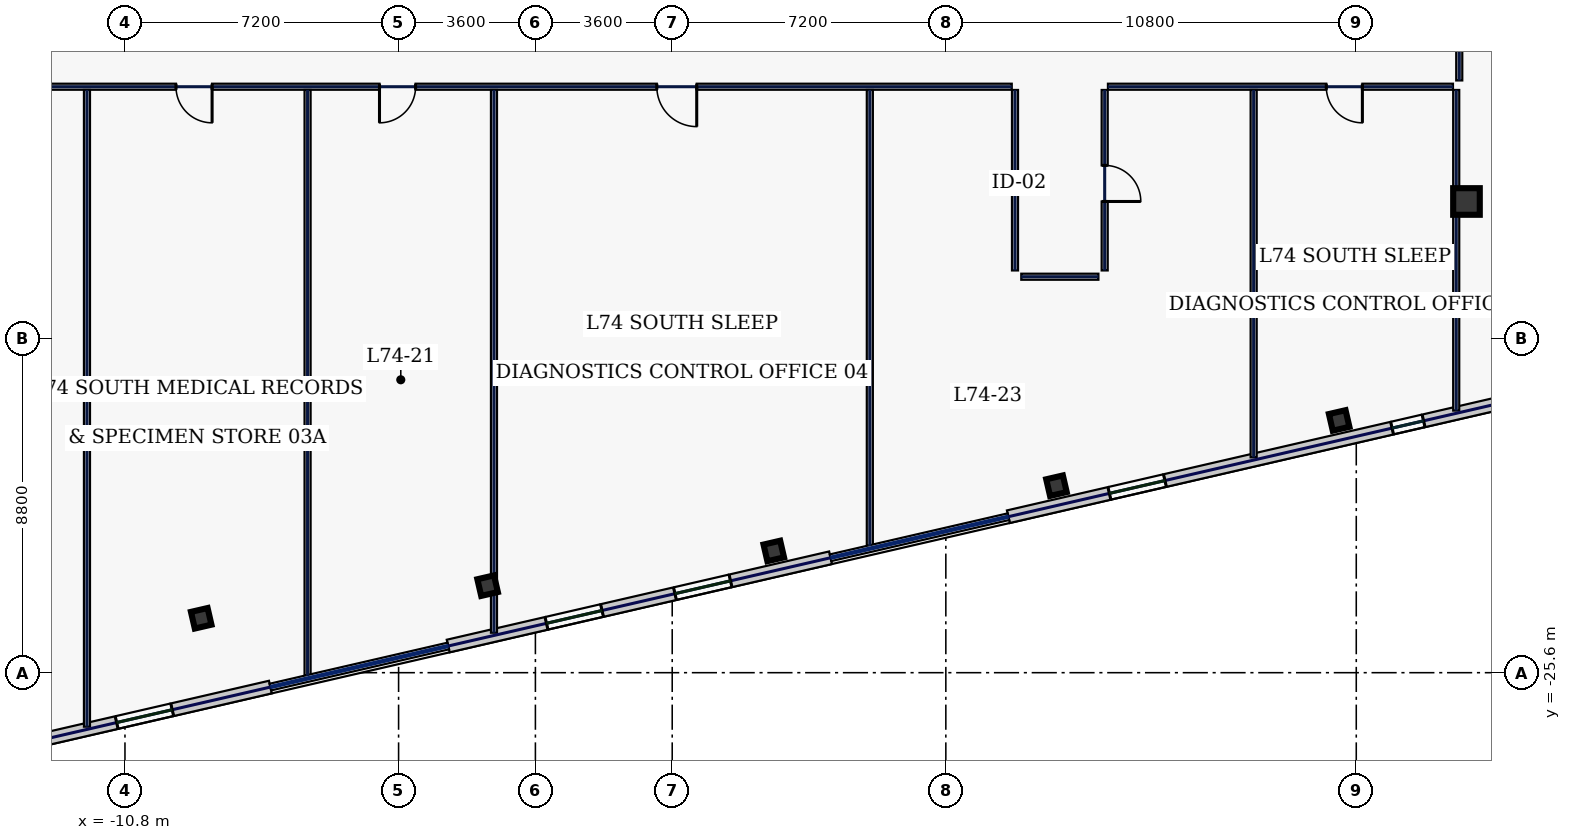
"""IFC4 building model, lengths in metres.
Left out: names, types, materials, properties, quantities, classifications, styles, units other than length and angle.
Written with IfcOpenShell. Run it as: python <this file> out.ifc"""

import sys

from ifc_helpers import new_model, si_unit, direction, frame, frame_2d, origin, origin_2d, place, context, subcontext, project, spatial, rectangle, hollow_rectangle, extrude, element, fill, save


model = new_model("IFC4")
c1 = context("Model", 3, precision=1e-05, world=origin(), true_north=direction((0.0, 1.0)))
c2 = subcontext(c1, "Body", "Model", "MODEL_VIEW")
j1 = project(units=[si_unit("LENGTHUNIT", "METRE"), si_unit("PLANEANGLEUNIT", "RADIAN")], contexts=[c1])
p1 = place(None, origin())
s1 = spatial("IfcSite", under=j1, at=p1, CompositionType="ELEMENT")
p2 = place(p1, origin())
s2 = spatial("IfcBuilding", under=s1, at=p2, CompositionType="ELEMENT")
p3 = place(p2, frame((0.0, 0.0, 317.0)))
s3 = spatial("IfcBuildingStorey", under=s2, at=p3, CompositionType="ELEMENT", Elevation=317.0)
p4 = place(p3, frame((24.5, -13.2, 0.0), z_axis=(0.0, 0.0, 1.0), x_axis=(1.0, 0.0, 0.0)))
e1 = element("IfcColumn", 1, at=p4, inside=s3, PredefinedType="COLUMN", context=c2, shape_type="SweptSolid", body=[
    extrude(hollow_rectangle(XDim=0.7, YDim=0.7, WallThickness=0.032, at=origin_2d()), origin(), (0.0, 0.0, 1.0), 3.74),
])
for number, where, z_axis, x_axis in (
    (2, (-8.794, -24.168, 0.0), (0.0, 0.0, 1.0), (0.974, 0.225, 0.0)),
    (3, (-1.258, -23.31, 0.0), (0.0, 0.0, 1.0), (0.974, 0.225, 0.0)),
    (4, (6.273, -22.397, 0.0), (0.0, 0.0, 1.0), (0.974, 0.225, 0.0)),
    (5, (13.711, -20.68, 0.0), (0.0, 0.0, 1.0), (0.974, 0.225, 0.0)),
    (6, (21.15, -18.962, 0.0), (0.0, 0.0, 1.0), (0.974, 0.225, 0.0)),
):
    element("IfcColumn", number, at=place(p3, frame(where, z_axis=z_axis, x_axis=x_axis)), inside=s3, PredefinedType="COLUMN", context=c2, shape_type="SweptSolid", body=[
        extrude(hollow_rectangle(XDim=0.45, YDim=0.45, WallThickness=0.022, at=origin_2d()), origin(), (0.0, 0.0, 1.0), 3.74),
    ])
p5 = place(p3, frame((-24.03, -29.916, 0.0), z_axis=(0.0, 0.0, 1.0), x_axis=(0.974370978061, 0.224947098473, 0.0)))
e7 = element("IfcWall", 7, at=p5, inside=s3, PredefinedType="STANDARD", context=c2, shape_type="SweptSolid", body=[
    extrude(rectangle(XDim=17.506, YDim=0.34, at=frame_2d((8.753, 0.0))), origin(), (0.0, 0.0, 1.0), 3.74),
])
p6 = place(p5, frame((2.35, 0.0, 0.9)))
e8 = element("IfcOpeningElement", 8, at=p6, cuts=e7, PredefinedType="OPENING", context=c2, shape_type="SweptSolid", body=[
    extrude(rectangle(XDim=1.5, YDim=2.0, at=frame_2d((0.75, 1.0))), frame((0.0, 0.18, 0.0), z_axis=(0.0, -1.0, 0.0), x_axis=(1.0, 0.0, 0.0)), (0.0, 0.0, 1.0), 0.36),
])
p7 = place(p5, frame((5.817, 0.0, 0.9)))
e9 = element("IfcOpeningElement", 9, at=p7, cuts=e7, PredefinedType="OPENING", context=c2, shape_type="SweptSolid", body=[
    extrude(rectangle(XDim=1.5, YDim=2.0, at=frame_2d((0.75, 1.0))), frame((0.0, 0.18, 0.0), z_axis=(0.0, -1.0, 0.0), x_axis=(1.0, 0.0, 0.0)), (0.0, 0.0, 1.0), 0.36),
])
p8 = place(p5, frame((9.886, 0.0, 0.9)))
e10 = element("IfcOpeningElement", 10, at=p8, cuts=e7, PredefinedType="OPENING", context=c2, shape_type="SweptSolid", body=[
    extrude(rectangle(XDim=1.5, YDim=2.0, at=frame_2d((0.75, 1.0))), frame((0.0, 0.18, 0.0), z_axis=(0.0, -1.0, 0.0), x_axis=(1.0, 0.0, 0.0)), (0.0, 0.0, 1.0), 0.36),
])
p9 = place(p5, frame((13.353, 0.0, 0.9)))
e11 = element("IfcOpeningElement", 11, at=p9, cuts=e7, PredefinedType="OPENING", context=c2, shape_type="SweptSolid", body=[
    extrude(rectangle(XDim=1.5, YDim=2.0, at=frame_2d((0.75, 1.0))), frame((0.0, 0.18, 0.0), z_axis=(0.0, -1.0, 0.0), x_axis=(1.0, 0.0, 0.0)), (0.0, 0.0, 1.0), 0.36),
])
p10 = place(p3, frame((-2.295, -24.898, 0.0), z_axis=(0.0, 0.0, 1.0), x_axis=(0.974370872906, 0.224947553958, 0.0)))
e12 = element("IfcWall", 12, at=p10, inside=s3, PredefinedType="STANDARD", context=c2, shape_type="SweptSolid", body=[
    extrude(rectangle(XDim=10.328, YDim=0.34, at=frame_2d((5.164, 0.0))), origin(), (0.0, 0.0, 1.0), 3.74),
])
p11 = place(p10, frame((2.655, 0.0, 0.9)))
e13 = element("IfcOpeningElement", 13, at=p11, cuts=e12, PredefinedType="OPENING", context=c2, shape_type="SweptSolid", body=[
    extrude(rectangle(XDim=1.5, YDim=2.0, at=frame_2d((0.75, 1.0))), frame((0.0, 0.18, 0.0), z_axis=(0.0, -1.0, 0.0), x_axis=(1.0, 0.0, 0.0)), (0.0, 0.0, 1.0), 0.36),
])
p12 = place(p10, frame((6.124, 0.0, 0.9)))
e14 = element("IfcOpeningElement", 14, at=p12, cuts=e12, PredefinedType="OPENING", context=c2, shape_type="SweptSolid", body=[
    extrude(rectangle(XDim=1.5, YDim=2.0, at=frame_2d((0.75, 1.0))), frame((0.0, 0.18, 0.0), z_axis=(0.0, -1.0, 0.0), x_axis=(1.0, 0.0, 0.0)), (0.0, 0.0, 1.0), 0.36),
])
p13 = place(p3, frame((12.445, -21.495, 0.0), z_axis=(0.0, 0.0, 1.0), x_axis=(0.974369392164, 0.224953967767, 0.0)))
e15 = element("IfcWall", 15, at=p13, inside=s3, PredefinedType="STANDARD", context=c2, shape_type="SweptSolid", body=[
    extrude(rectangle(XDim=17.366, YDim=0.34, at=frame_2d((8.683, 0.0))), origin(), (0.0, 0.0, 1.0), 3.74),
])
p14 = place(p13, frame((2.729, 0.0, 0.9)))
e16 = element("IfcOpeningElement", 16, at=p14, cuts=e15, PredefinedType="OPENING", context=c2, shape_type="SweptSolid", body=[
    extrude(rectangle(XDim=1.5, YDim=2.0, at=frame_2d((0.75, 1.0))), frame((0.0, 0.18, 0.0), z_axis=(0.0, -1.0, 0.0), x_axis=(1.0, 0.0, 0.0)), (0.0, 0.0, 1.0), 0.36),
])
p15 = place(p13, frame((10.363, 0.0, 0.9)))
e17 = element("IfcOpeningElement", 17, at=p15, cuts=e15, PredefinedType="OPENING", context=c2, shape_type="SweptSolid", body=[
    extrude(rectangle(XDim=0.85, YDim=1.85, at=frame_2d((0.425, 0.925))), frame((0.0, 0.18, 0.0), z_axis=(0.0, -1.0, 0.0), x_axis=(1.0, 0.0, 0.0)), (0.0, 0.0, 1.0), 0.36),
])
p16 = place(p13, frame((13.875, 0.0, 0.9)))
e18 = element("IfcOpeningElement", 18, at=p16, cuts=e15, PredefinedType="OPENING", context=c2, shape_type="SweptSolid", body=[
    extrude(rectangle(XDim=1.5, YDim=2.0, at=frame_2d((0.75, 1.0))), frame((0.0, 0.18, 0.0), z_axis=(0.0, -1.0, 0.0), x_axis=(1.0, 0.0, 0.0)), (0.0, 0.0, 1.0), 0.36),
])
p17 = place(p3, frame((32.686, -12.276, 0.0), z_axis=(0.0, 0.0, 1.0), x_axis=(-0.224953091034, 0.974369594576, 0.0)))
e19 = element("IfcWall", 19, at=p17, inside=s3, PredefinedType="STANDARD", context=c2, shape_type="SweptSolid", body=[
    extrude(rectangle(XDim=36.2, YDim=0.34, at=frame_2d((18.1, 0.0))), origin(), (0.0, 0.0, 1.0), 3.74),
])
p18 = place(p17, frame((3.725, 0.0, 0.58)))
e20 = element("IfcOpeningElement", 20, at=p18, cuts=e19, PredefinedType="OPENING", context=c2, shape_type="SweptSolid", body=[
    extrude(rectangle(XDim=1.6, YDim=2.3, at=frame_2d((0.8, 1.15))), frame((0.0, 0.18, 0.0), z_axis=(0.0, -1.0, 0.0), x_axis=(1.0, 0.0, 0.0)), (0.0, 0.0, 1.0), 0.36),
])
p19 = place(p17, frame((12.775, 0.0, 0.58)))
e21 = element("IfcOpeningElement", 21, at=p19, cuts=e19, PredefinedType="OPENING", context=c2, shape_type="SweptSolid", body=[
    extrude(rectangle(XDim=1.6, YDim=2.3, at=frame_2d((0.8, 1.15))), frame((0.0, 0.18, 0.0), z_axis=(0.0, -1.0, 0.0), x_axis=(1.0, 0.0, 0.0)), (0.0, 0.0, 1.0), 0.36),
])
p20 = place(p17, frame((21.825, 0.0, 0.58)))
e22 = element("IfcOpeningElement", 22, at=p20, cuts=e19, PredefinedType="OPENING", context=c2, shape_type="SweptSolid", body=[
    extrude(rectangle(XDim=1.6, YDim=2.3, at=frame_2d((0.8, 1.15))), frame((0.0, 0.18, 0.0), z_axis=(0.0, -1.0, 0.0), x_axis=(1.0, 0.0, 0.0)), (0.0, 0.0, 1.0), 0.36),
])
p21 = place(p17, frame((30.875, 0.0, 0.58)))
e23 = element("IfcOpeningElement", 23, at=p21, cuts=e19, PredefinedType="OPENING", context=c2, shape_type="SweptSolid", body=[
    extrude(rectangle(XDim=1.6, YDim=2.3, at=frame_2d((0.8, 1.15))), frame((0.0, 0.18, 0.0), z_axis=(0.0, -1.0, 0.0), x_axis=(1.0, 0.0, 0.0)), (0.0, 0.0, 1.0), 0.36),
])
p22 = place(p3, frame((24.31, 10.115, 0.0), z_axis=(0.0, 0.0, 1.0), x_axis=(0.0, -1.0, 0.0)))
e24 = element("IfcWall", 24, at=p22, inside=s3, PredefinedType="PARTITIONING", context=c2, shape_type="SweptSolid", body=[
    extrude(rectangle(XDim=20.13, YDim=0.16, at=frame_2d((10.065, 0.0))), origin(), (0.0, 0.0, 1.0), 3.74),
])
p23 = place(p22, frame((15.206, 0.0, 0.0)))
e25 = element("IfcOpeningElement", 25, at=p23, cuts=e24, PredefinedType="OPENING", context=c2, shape_type="SweptSolid", body=[
    extrude(rectangle(XDim=0.95, YDim=2.2, at=frame_2d((0.475, 1.1))), frame((0.0, 0.09, 0.0), z_axis=(0.0, -1.0, 0.0), x_axis=(1.0, 0.0, 0.0)), (0.0, 0.0, 1.0), 0.18),
])
p24 = place(p22, frame((5.444, 0.0, 0.0)))
e26 = element("IfcOpeningElement", 26, at=p24, cuts=e24, PredefinedType="OPENING", context=c2, shape_type="SweptSolid", body=[
    extrude(rectangle(XDim=0.95, YDim=2.2, at=frame_2d((0.475, 1.1))), frame((0.0, 0.09, 0.0), z_axis=(0.0, -1.0, 0.0), x_axis=(1.0, 0.0, 0.0)), (0.0, 0.0, 1.0), 0.18),
])
p25 = place(p3, frame((24.145, -10.18, 0.0), z_axis=(0.0, 0.0, 1.0), x_axis=(-1.0, 0.0, 0.0)))
e27 = element("IfcWall", 27, at=p25, inside=s3, PredefinedType="PARTITIONING", context=c2, shape_type="SweptSolid", body=[
    extrude(rectangle(XDim=9.08, YDim=0.16, at=frame_2d((4.54, 0.0))), origin(), (0.0, 0.0, 1.0), 3.74),
])
p26 = place(p25, frame((2.384, 0.0, 0.0)))
e28 = element("IfcOpeningElement", 28, at=p26, cuts=e27, PredefinedType="OPENING", context=c2, shape_type="SweptSolid", body=[
    extrude(rectangle(XDim=0.95, YDim=2.2, at=frame_2d((0.475, 1.1))), frame((0.0, 0.09, 0.0), z_axis=(0.0, -1.0, 0.0), x_axis=(1.0, 0.0, 0.0)), (0.0, 0.0, 1.0), 0.18),
])
p27 = place(p3, frame((14.98, -10.265, 0.0), z_axis=(0.0, 0.0, 1.0), x_axis=(0.0, -1.0, 0.0)))
e29 = element("IfcWall", 29, at=p27, inside=s3, PredefinedType="PARTITIONING", context=c2, shape_type="SweptSolid", body=[
    extrude(rectangle(XDim=4.75, YDim=0.16, at=frame_2d((2.375, 0.0))), origin(), (0.0, 0.0, 1.0), 3.74),
])
p28 = place(p27, frame((1.985, 0.0, 0.0)))
e30 = element("IfcOpeningElement", 30, at=p28, cuts=e29, PredefinedType="OPENING", context=c2, shape_type="SweptSolid", body=[
    extrude(rectangle(XDim=0.95, YDim=2.2, at=frame_2d((0.475, 1.1))), frame((0.0, 0.09, 0.0), z_axis=(0.0, -1.0, 0.0), x_axis=(1.0, 0.0, 0.0)), (0.0, 0.0, 1.0), 0.18),
])
p29 = place(p3, frame((14.815, -15.18, 0.0), z_axis=(0.0, 0.0, 1.0), x_axis=(-1.0, 0.0, 0.0)))
e31 = element("IfcWall", 31, at=p29, inside=s3, PredefinedType="PARTITIONING", context=c2, shape_type="SweptSolid", body=[
    extrude(rectangle(XDim=2.03, YDim=0.16, at=frame_2d((1.015, 0.0))), origin(), (0.0, 0.0, 1.0), 3.74),
])
p30 = place(p3, frame((12.62, -15.015, 0.0), z_axis=(0.0, 0.0, 1.0), x_axis=(0.0, 1.0, 0.0)))
e32 = element("IfcWall", 32, at=p30, inside=s3, PredefinedType="PARTITIONING", context=c2, shape_type="SweptSolid", body=[
    extrude(rectangle(XDim=4.75, YDim=0.16, at=frame_2d((2.375, 0.0))), origin(), (0.0, 0.0, 1.0), 3.74),
])
p31 = place(p3, frame((12.535, -10.18, 0.0), z_axis=(0.0, 0.0, 1.0), x_axis=(-1.0, 0.0, 0.0)))
e33 = element("IfcWall", 33, at=p31, inside=s3, PredefinedType="PARTITIONING", context=c2, shape_type="SweptSolid", body=[
    extrude(rectangle(XDim=36.68, YDim=0.16, at=frame_2d((18.34, 0.0))), origin(), (0.0, 0.0, 1.0), 3.74),
])
p32 = place(p31, frame((33.856, 0.0, 0.0)))
e34 = element("IfcOpeningElement", 34, at=p32, cuts=e33, PredefinedType="OPENING", context=c2, shape_type="SweptSolid", body=[
    extrude(rectangle(XDim=1.15, YDim=2.2, at=frame_2d((0.575, 1.1))), frame((0.0, 0.09, 0.0), z_axis=(0.0, -1.0, 0.0), x_axis=(1.0, 0.0, 0.0)), (0.0, 0.0, 1.0), 0.18),
])
p33 = place(p31, frame((27.835, 0.0, 0.0)))
e35 = element("IfcOpeningElement", 35, at=p33, cuts=e33, PredefinedType="OPENING", context=c2, shape_type="SweptSolid", body=[
    extrude(rectangle(XDim=0.95, YDim=2.2, at=frame_2d((0.475, 1.1))), frame((0.0, 0.09, 0.0), z_axis=(0.0, -1.0, 0.0), x_axis=(1.0, 0.0, 0.0)), (0.0, 0.0, 1.0), 0.18),
])
p34 = place(p31, frame((21.042, 0.0, 0.0)))
e36 = element("IfcOpeningElement", 36, at=p34, cuts=e33, PredefinedType="OPENING", context=c2, shape_type="SweptSolid", body=[
    extrude(rectangle(XDim=0.95, YDim=2.2, at=frame_2d((0.475, 1.1))), frame((0.0, 0.09, 0.0), z_axis=(0.0, -1.0, 0.0), x_axis=(1.0, 0.0, 0.0)), (0.0, 0.0, 1.0), 0.18),
])
p35 = place(p31, frame((15.688, 0.0, 0.0)))
e37 = element("IfcOpeningElement", 37, at=p35, cuts=e33, PredefinedType="OPENING", context=c2, shape_type="SweptSolid", body=[
    extrude(rectangle(XDim=0.95, YDim=2.2, at=frame_2d((0.475, 1.1))), frame((0.0, 0.09, 0.0), z_axis=(0.0, -1.0, 0.0), x_axis=(1.0, 0.0, 0.0)), (0.0, 0.0, 1.0), 0.18),
])
p36 = place(p31, frame((8.29, 0.0, 0.0)))
e38 = element("IfcOpeningElement", 38, at=p36, cuts=e33, PredefinedType="OPENING", context=c2, shape_type="SweptSolid", body=[
    extrude(rectangle(XDim=1.05, YDim=2.2, at=frame_2d((0.525, 1.1))), frame((0.0, 0.09, 0.0), z_axis=(0.0, -1.0, 0.0), x_axis=(1.0, 0.0, 0.0)), (0.0, 0.0, 1.0), 0.18),
])
p37 = place(p3, frame((24.23, -18.703, 0.0), z_axis=(0.0, 0.0, 1.0), x_axis=(0.0, 1.0, 0.0)))
e39 = element("IfcWall", 39, at=p37, inside=s3, PredefinedType="PARTITIONING", context=c2, shape_type="SweptSolid", body=[
    extrude(rectangle(XDim=8.438, YDim=0.16, at=frame_2d((4.219, 0.0))), origin(), (0.0, 0.0, 1.0), 3.74),
])
p38 = place(p3, frame((-11.8, -27.021, 0.0), z_axis=(0.0, 0.0, 1.0), x_axis=(0.0, 1.0, 0.0)))
e40 = element("IfcWall", 40, at=p38, inside=s3, PredefinedType="PARTITIONING", context=c2, shape_type="SweptSolid", body=[
    extrude(rectangle(XDim=16.756, YDim=0.16, at=frame_2d((8.378, 0.0))), origin(), (0.0, 0.0, 1.0), 3.74),
])
p39 = place(p3, frame((-1.09, -24.548, 0.0), z_axis=(0.0, 0.0, 1.0), x_axis=(0.0, 1.0, 0.0)))
e41 = element("IfcWall", 41, at=p39, inside=s3, PredefinedType="PARTITIONING", context=c2, shape_type="SweptSolid", body=[
    extrude(rectangle(XDim=14.283, YDim=0.16, at=frame_2d((7.142, 0.0))), origin(), (0.0, 0.0, 1.0), 3.74),
])
p40 = place(p3, frame((8.8, -22.265, 0.0), z_axis=(0.0, 0.0, 1.0), x_axis=(0.0, 1.0, 0.0)))
e42 = element("IfcWall", 42, at=p40, inside=s3, PredefinedType="PARTITIONING", context=c2, shape_type="SweptSolid", body=[
    extrude(rectangle(XDim=12.0, YDim=0.16, at=frame_2d((6.0, 0.0))), origin(), (0.0, 0.0, 1.0), 3.74),
])
p41 = place(p3, frame((18.9, -19.933, 0.0), z_axis=(0.0, 0.0, 1.0), x_axis=(0.0, 1.0, 0.0)))
e43 = element("IfcWall", 43, at=p41, inside=s3, PredefinedType="PARTITIONING", context=c2, shape_type="SweptSolid", body=[
    extrude(rectangle(XDim=9.668, YDim=0.16, at=frame_2d((4.834, 0.0))), origin(), (0.0, 0.0, 1.0), 3.74),
])
p42 = place(p3, frame((-5.995, -25.681, 0.0), z_axis=(0.0, 0.0, 1.0), x_axis=(0.0, 1.0, 0.0)))
e44 = element("IfcWall", 44, at=p42, inside=s3, PredefinedType="PARTITIONING", context=c2, shape_type="SweptSolid", body=[
    extrude(rectangle(XDim=15.416, YDim=0.16, at=frame_2d((7.708, 0.0))), origin(), (0.0, 0.0, 1.0), 3.74),
])
p43 = place(p9, origin())
e45 = element("IfcWindow", 45, at=p43, inside=s3, PartitioningType="SINGLE_PANEL", PredefinedType="WINDOW", context=c2, shape_type="SweptSolid", body=[
    extrude(rectangle(XDim=1.5, YDim=2.0, at=frame_2d((0.75, 1.0))), frame((0.0, 0.03, 0.0), z_axis=(0.0, -1.0, 0.0), x_axis=(1.0, 0.0, 0.0)), (0.0, 0.0, 1.0), 0.06),
])
fill(e11, e45)
p44 = place(p11, origin())
e46 = element("IfcWindow", 46, at=p44, inside=s3, PartitioningType="SINGLE_PANEL", PredefinedType="WINDOW", context=c2, shape_type="SweptSolid", body=[
    extrude(rectangle(XDim=1.5, YDim=2.0, at=frame_2d((0.75, 1.0))), frame((0.0, 0.03, 0.0), z_axis=(0.0, -1.0, 0.0), x_axis=(1.0, 0.0, 0.0)), (0.0, 0.0, 1.0), 0.06),
])
fill(e13, e46)
p45 = place(p12, origin())
e47 = element("IfcWindow", 47, at=p45, inside=s3, PartitioningType="SINGLE_PANEL", PredefinedType="WINDOW", context=c2, shape_type="SweptSolid", body=[
    extrude(rectangle(XDim=1.5, YDim=2.0, at=frame_2d((0.75, 1.0))), frame((0.0, 0.03, 0.0), z_axis=(0.0, -1.0, 0.0), x_axis=(1.0, 0.0, 0.0)), (0.0, 0.0, 1.0), 0.06),
])
fill(e14, e47)
p46 = place(p14, origin())
e48 = element("IfcWindow", 48, at=p46, inside=s3, PartitioningType="SINGLE_PANEL", PredefinedType="WINDOW", context=c2, shape_type="SweptSolid", body=[
    extrude(rectangle(XDim=1.5, YDim=2.0, at=frame_2d((0.75, 1.0))), frame((0.0, 0.03, 0.0), z_axis=(0.0, -1.0, 0.0), x_axis=(1.0, 0.0, 0.0)), (0.0, 0.0, 1.0), 0.06),
])
fill(e16, e48)
p47 = place(p15, origin())
e49 = element("IfcWindow", 49, at=p47, inside=s3, PartitioningType="SINGLE_PANEL", PredefinedType="WINDOW", context=c2, shape_type="SweptSolid", body=[
    extrude(rectangle(XDim=0.85, YDim=1.85, at=frame_2d((0.425, 0.925))), frame((0.0, 0.03, 0.0), z_axis=(0.0, -1.0, 0.0), x_axis=(1.0, 0.0, 0.0)), (0.0, 0.0, 1.0), 0.06),
])
fill(e17, e49)
p48 = place(p34, origin())
e50 = element("IfcDoor", 50, at=p48, inside=s3, OperationType="SINGLE_SWING_LEFT", PredefinedType="DOOR", context=c2, shape_type="SweptSolid", body=[
    extrude(rectangle(XDim=0.95, YDim=2.2, at=frame_2d((0.475, 1.1))), frame((0.0, 0.025, 0.0), z_axis=(0.0, -1.0, 0.0), x_axis=(1.0, 0.0, 0.0)), (0.0, 0.0, 1.0), 0.05),
])
fill(e36, e50)
p49 = place(p35, origin())
e51 = element("IfcDoor", 51, at=p49, inside=s3, OperationType="SINGLE_SWING_RIGHT", PredefinedType="DOOR", context=c2, shape_type="SweptSolid", body=[
    extrude(rectangle(XDim=0.95, YDim=2.2, at=frame_2d((0.475, 1.1))), frame((0.0, 0.025, 0.0), z_axis=(0.0, -1.0, 0.0), x_axis=(1.0, 0.0, 0.0)), (0.0, 0.0, 1.0), 0.05),
])
fill(e37, e51)
p50 = place(p36, origin())
e52 = element("IfcDoor", 52, at=p50, inside=s3, OperationType="SINGLE_SWING_LEFT", PredefinedType="DOOR", context=c2, shape_type="SweptSolid", body=[
    extrude(rectangle(XDim=1.05, YDim=2.2, at=frame_2d((0.525, 1.1))), frame((0.0, 0.025, 0.0), z_axis=(0.0, -1.0, 0.0), x_axis=(1.0, 0.0, 0.0)), (0.0, 0.0, 1.0), 0.05),
])
fill(e38, e52)
p51 = place(p28, origin())
e53 = element("IfcDoor", 53, at=p51, inside=s3, OperationType="SINGLE_SWING_RIGHT", PredefinedType="DOOR", context=c2, shape_type="SweptSolid", body=[
    extrude(rectangle(XDim=0.95, YDim=2.2, at=frame_2d((0.475, 1.1))), frame((0.0, 0.025, 0.0), z_axis=(0.0, -1.0, 0.0), x_axis=(1.0, 0.0, 0.0)), (0.0, 0.0, 1.0), 0.05),
])
fill(e30, e53)
p52 = place(p26, origin())
e54 = element("IfcDoor", 54, at=p52, inside=s3, OperationType="SINGLE_SWING_LEFT", PredefinedType="DOOR", context=c2, shape_type="SweptSolid", body=[
    extrude(rectangle(XDim=0.95, YDim=2.2, at=frame_2d((0.475, 1.1))), frame((0.0, 0.025, 0.0), z_axis=(0.0, -1.0, 0.0), x_axis=(1.0, 0.0, 0.0)), (0.0, 0.0, 1.0), 0.05),
])
fill(e28, e54)
save(model, sys.argv[1])
